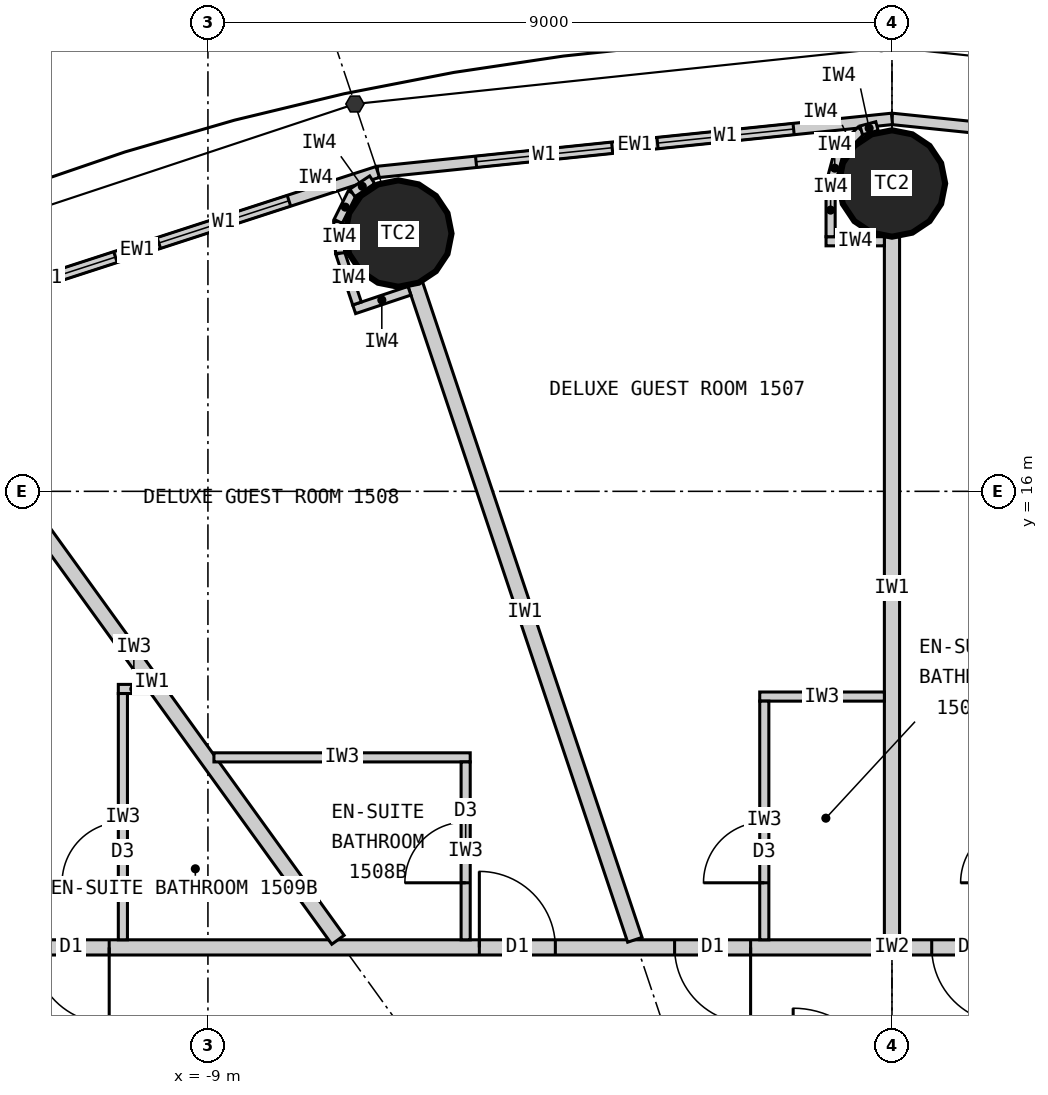
"""IFC4 building model, lengths in metres.
Left out: names, types, materials, properties, quantities, classifications, styles, units other than length and angle.
Written with IfcOpenShell. Run it as: python <this file> out.ifc"""

import sys

from ifc_helpers import new_model, si_unit, direction, frame, frame_2d, origin, origin_2d, place, context, subcontext, project, spatial, rectangle, circle, extrude, element, fill, save


model = new_model("IFC4")
c1 = context("Model", 3, precision=1e-05, world=origin(), true_north=direction((0.0, 1.0)))
c2 = subcontext(c1, "Body", "Model", "MODEL_VIEW")
j1 = project(units=[si_unit("LENGTHUNIT", "METRE"), si_unit("PLANEANGLEUNIT", "RADIAN")], contexts=[c1])
p1 = place(None, origin())
s1 = spatial("IfcSite", under=j1, at=p1, CompositionType="ELEMENT")
p2 = place(p1, origin())
s2 = spatial("IfcBuilding", under=s1, at=p2, CompositionType="ELEMENT")
p3 = place(p2, frame((0.0, 0.0, 63.9)))
s3 = spatial("IfcBuildingStorey", under=s2, at=p3, CompositionType="ELEMENT", Elevation=63.9)
for number, where, z_axis, x_axis in (
    (1, (0.0, 20.05, 0.0), (0.0, 0.0, 1.0), (1.0, 0.0, 0.0)),
    (2, (-6.495, 19.391, 0.0), (0.0, 0.0, 1.0), (1.0, 0.0, 0.0)),
):
    element("IfcColumn", number, at=place(p3, frame(where, z_axis=z_axis, x_axis=x_axis)), inside=s3, PredefinedType="COLUMN", context=c2, shape_type="SweptSolid", body=[
        extrude(circle(Radius=0.7, at=origin_2d()), origin(), (0.0, 0.0, 1.0), 3.3),
    ])
p4 = place(p3, frame((6.766, 20.202, 0.0), z_axis=(0.0, 0.0, 1.0), x_axis=(-0.994721394369, 0.102612609291, 0.0)))
e3 = element("IfcWall", 3, at=p4, inside=s3, PredefinedType="ELEMENTEDWALL", context=c2, shape_type="SweptSolid", body=[
    extrude(rectangle(XDim=6.802, YDim=0.15, at=frame_2d((3.401, 0.0))), origin(), (0.0, 0.0, 1.0), 3.12),
])
p5 = place(p4, frame((1.301, 0.0, 0.9)))
e4 = element("IfcOpeningElement", 4, at=p5, cuts=e3, PredefinedType="OPENING", context=c2, shape_type="SweptSolid", body=[
    extrude(rectangle(XDim=1.8, YDim=1.9, at=frame_2d((0.9, 0.95))), frame((0.0, 0.085, 0.0), z_axis=(0.0, -1.0, 0.0), x_axis=(1.0, 0.0, 0.0)), (0.0, 0.0, 1.0), 0.17),
])
p6 = place(p4, frame((3.701, 0.0, 0.9)))
e5 = element("IfcOpeningElement", 5, at=p6, cuts=e3, PredefinedType="OPENING", context=c2, shape_type="SweptSolid", body=[
    extrude(rectangle(XDim=1.8, YDim=1.9, at=frame_2d((0.9, 0.95))), frame((0.0, 0.085, 0.0), z_axis=(0.0, -1.0, 0.0), x_axis=(1.0, 0.0, 0.0)), (0.0, 0.0, 1.0), 0.17),
])
p7 = place(p3, frame((0.0, 20.9, 0.0), z_axis=(0.0, 0.0, 1.0), x_axis=(-0.994721394369, -0.102612609291, 0.0)))
e6 = element("IfcWall", 6, at=p7, inside=s3, PredefinedType="ELEMENTEDWALL", context=c2, shape_type="SweptSolid", body=[
    extrude(rectangle(XDim=6.802, YDim=0.15, at=frame_2d((3.401, 0.0))), origin(), (0.0, 0.0, 1.0), 3.12),
])
p8 = place(p7, frame((1.301, 0.0, 0.9)))
e7 = element("IfcOpeningElement", 7, at=p8, cuts=e6, PredefinedType="OPENING", context=c2, shape_type="SweptSolid", body=[
    extrude(rectangle(XDim=1.8, YDim=1.9, at=frame_2d((0.9, 0.95))), frame((0.0, 0.085, 0.0), z_axis=(0.0, -1.0, 0.0), x_axis=(1.0, 0.0, 0.0)), (0.0, 0.0, 1.0), 0.17),
])
p9 = place(p7, frame((3.701, 0.0, 0.9)))
e8 = element("IfcOpeningElement", 8, at=p9, cuts=e6, PredefinedType="OPENING", context=c2, shape_type="SweptSolid", body=[
    extrude(rectangle(XDim=1.8, YDim=1.9, at=frame_2d((0.9, 0.95))), frame((0.0, 0.085, 0.0), z_axis=(0.0, -1.0, 0.0), x_axis=(1.0, 0.0, 0.0)), (0.0, 0.0, 1.0), 0.17),
])
p10 = place(p3, frame((-6.766, 20.202, 0.0), z_axis=(0.0, 0.0, 1.0), x_axis=(-0.951137534625, -0.308767534285, 0.0)))
e9 = element("IfcWall", 9, at=p10, inside=s3, PredefinedType="ELEMENTEDWALL", context=c2, shape_type="SweptSolid", body=[
    extrude(rectangle(XDim=6.655, YDim=0.15, at=frame_2d((3.328, 0.0))), origin(), (0.0, 0.0, 1.0), 3.12),
])
p11 = place(p10, frame((1.228, 0.0, 0.9)))
e10 = element("IfcOpeningElement", 10, at=p11, cuts=e9, PredefinedType="OPENING", context=c2, shape_type="SweptSolid", body=[
    extrude(rectangle(XDim=1.8, YDim=1.9, at=frame_2d((0.9, 0.95))), frame((0.0, 0.085, 0.0), z_axis=(0.0, -1.0, 0.0), x_axis=(1.0, 0.0, 0.0)), (0.0, 0.0, 1.0), 0.17),
])
p12 = place(p10, frame((3.628, 0.0, 0.9)))
e11 = element("IfcOpeningElement", 11, at=p12, cuts=e9, PredefinedType="OPENING", context=c2, shape_type="SweptSolid", body=[
    extrude(rectangle(XDim=1.8, YDim=1.9, at=frame_2d((0.9, 0.95))), frame((0.0, 0.085, 0.0), z_axis=(0.0, -1.0, 0.0), x_axis=(1.0, 0.0, 0.0)), (0.0, 0.0, 1.0), 0.17),
])
p13 = place(p3, frame((-14.1, 10.0, 0.0), z_axis=(0.0, 0.0, 1.0), x_axis=(1.0, 0.0, 0.0)))
e12 = element("IfcWall", 12, at=p13, inside=s3, PredefinedType="PARTITIONING", context=c2, shape_type="SweptSolid", body=[
    extrude(rectangle(XDim=28.2, YDim=0.2, at=frame_2d((14.1, 0.0))), origin(), (0.0, 0.0, 1.0), 3.12),
])
p14 = place(p13, frame((18.529, 0.0, 0.0)))
e13 = element("IfcOpeningElement", 13, at=p14, cuts=e12, PredefinedType="OPENING", context=c2, shape_type="SweptSolid", body=[
    extrude(rectangle(XDim=1.0, YDim=2.2, at=frame_2d((0.5, 1.1))), frame((0.0, 0.11, 0.0), z_axis=(0.0, -1.0, 0.0), x_axis=(1.0, 0.0, 0.0)), (0.0, 0.0, 1.0), 0.22),
])
p15 = place(p13, frame((14.623, 0.0, 0.0)))
e14 = element("IfcOpeningElement", 14, at=p15, cuts=e12, PredefinedType="OPENING", context=c2, shape_type="SweptSolid", body=[
    extrude(rectangle(XDim=1.0, YDim=2.2, at=frame_2d((0.5, 1.1))), frame((0.0, 0.11, 0.0), z_axis=(0.0, -1.0, 0.0), x_axis=(1.0, 0.0, 0.0)), (0.0, 0.0, 1.0), 0.22),
])
p16 = place(p13, frame((11.24, 0.0, 0.0)))
e15 = element("IfcOpeningElement", 15, at=p16, cuts=e12, PredefinedType="OPENING", context=c2, shape_type="SweptSolid", body=[
    extrude(rectangle(XDim=1.0, YDim=2.2, at=frame_2d((0.5, 1.1))), frame((0.0, 0.11, 0.0), z_axis=(0.0, -1.0, 0.0), x_axis=(1.0, 0.0, 0.0)), (0.0, 0.0, 1.0), 0.22),
])
p17 = place(p13, frame((8.671, 0.0, 0.0)))
e16 = element("IfcOpeningElement", 16, at=p17, cuts=e12, PredefinedType="OPENING", context=c2, shape_type="SweptSolid", body=[
    extrude(rectangle(XDim=1.0, YDim=2.2, at=frame_2d((0.5, 1.1))), frame((0.0, 0.11, 0.0), z_axis=(0.0, -1.0, 0.0), x_axis=(1.0, 0.0, 0.0)), (0.0, 0.0, 1.0), 0.22),
])
p18 = place(p13, frame((2.801, 0.0, 0.0)))
e17 = element("IfcOpeningElement", 17, at=p18, cuts=e12, PredefinedType="OPENING", context=c2, shape_type="SweptSolid", body=[
    extrude(rectangle(XDim=1.0, YDim=2.2, at=frame_2d((0.5, 1.1))), frame((0.0, 0.11, 0.0), z_axis=(0.0, -1.0, 0.0), x_axis=(1.0, 0.0, 0.0)), (0.0, 0.0, 1.0), 0.22),
])
p19 = place(p3, frame((0.0, 10.1, 0.0), z_axis=(0.0, 0.0, 1.0), x_axis=(0.0, 1.0, 0.0)))
e18 = element("IfcWall", 18, at=p19, inside=s3, PredefinedType="PARTITIONING", context=c2, shape_type="SweptSolid", body=[
    extrude(rectangle(XDim=9.25, YDim=0.2, at=frame_2d((4.625, 0.0))), origin(), (0.0, 0.0, 1.0), 2.32),
])
p20 = place(p3, frame((-3.383, 10.1, 0.0), z_axis=(0.0, 0.0, 1.0), x_axis=(-0.31759592231, 0.948226149256, 0.0)))
e19 = element("IfcWall", 19, at=p20, inside=s3, PredefinedType="PARTITIONING", context=c2, shape_type="SweptSolid", body=[
    extrude(rectangle(XDim=9.098, YDim=0.2, at=frame_2d((4.549, 0.0))), origin(), (0.0, 0.0, 1.0), 2.32),
])
p21 = place(p3, frame((-7.289, 10.1, 0.0), z_axis=(0.0, 0.0, 1.0), x_axis=(-0.585198353053, 0.810890182197, 0.0)))
e20 = element("IfcWall", 20, at=p21, inside=s3, PredefinedType="PARTITIONING", context=c2, shape_type="SweptSolid", body=[
    extrude(rectangle(XDim=8.36, YDim=0.2, at=frame_2d((4.18, 0.0))), origin(), (0.0, 0.0, 1.0), 2.32),
])
p22 = place(p3, frame((-0.1, 13.3, 0.0), z_axis=(0.0, 0.0, 1.0), x_axis=(-1.0, 0.0, 0.0)))
e21 = element("IfcWall", 21, at=p22, inside=s3, PredefinedType="PARTITIONING", context=c2, shape_type="SweptSolid", body=[
    extrude(rectangle(XDim=1.64, YDim=0.12, at=frame_2d((0.82, 0.0))), origin(), (0.0, 0.0, 1.0), 3.12),
])
p23 = place(p3, frame((-1.68, 10.1, 0.0), z_axis=(0.0, 0.0, 1.0), x_axis=(0.0, 1.0, 0.0)))
e22 = element("IfcWall", 22, at=p23, inside=s3, PredefinedType="PARTITIONING", context=c2, shape_type="SweptSolid", body=[
    extrude(rectangle(XDim=3.14, YDim=0.12, at=frame_2d((1.57, 0.0))), origin(), (0.0, 0.0, 1.0), 3.12),
])
p24 = place(p23, frame((0.75, 0.0, 0.0)))
e23 = element("IfcOpeningElement", 23, at=p24, cuts=e22, PredefinedType="OPENING", context=c2, shape_type="SweptSolid", body=[
    extrude(rectangle(XDim=0.8, YDim=2.1, at=frame_2d((0.4, 1.05))), frame((0.0, 0.07, 0.0), z_axis=(0.0, -1.0, 0.0), x_axis=(1.0, 0.0, 0.0)), (0.0, 0.0, 1.0), 0.14),
])
p25 = place(p3, frame((-8.921, 12.5, 0.0), z_axis=(0.0, 0.0, 1.0), x_axis=(1.0, 0.0, 0.0)))
e24 = element("IfcWall", 24, at=p25, inside=s3, PredefinedType="PARTITIONING", context=c2, shape_type="SweptSolid", body=[
    extrude(rectangle(XDim=3.372, YDim=0.12, at=frame_2d((1.686, 0.0))), origin(), (0.0, 0.0, 1.0), 3.12),
])
p26 = place(p3, frame((-5.609, 10.1, 0.0), z_axis=(0.0, 0.0, 1.0), x_axis=(0.0, 1.0, 0.0)))
e25 = element("IfcWall", 25, at=p26, inside=s3, PredefinedType="PARTITIONING", context=c2, shape_type="SweptSolid", body=[
    extrude(rectangle(XDim=2.34, YDim=0.12, at=frame_2d((1.17, 0.0))), origin(), (0.0, 0.0, 1.0), 3.12),
])
p27 = place(p26, frame((0.75, 0.0, 0.0)))
e26 = element("IfcOpeningElement", 26, at=p27, cuts=e25, PredefinedType="OPENING", context=c2, shape_type="SweptSolid", body=[
    extrude(rectangle(XDim=0.8, YDim=2.1, at=frame_2d((0.4, 1.05))), frame((0.0, 0.07, 0.0), z_axis=(0.0, -1.0, 0.0), x_axis=(1.0, 0.0, 0.0)), (0.0, 0.0, 1.0), 0.14),
])
p28 = place(p3, frame((-9.771, 13.4, 0.0), z_axis=(0.0, 0.0, 1.0), x_axis=(-1.0, 0.0, 0.0)))
e27 = element("IfcWall", 27, at=p28, inside=s3, PredefinedType="PARTITIONING", context=c2, shape_type="SweptSolid", body=[
    extrude(rectangle(XDim=0.408, YDim=0.12, at=frame_2d((0.204, 0.0))), origin(), (0.0, 0.0, 1.0), 3.12),
])
p29 = place(p3, frame((-10.119, 10.1, 0.0), z_axis=(0.0, 0.0, 1.0), x_axis=(0.0, 1.0, 0.0)))
e28 = element("IfcWall", 28, at=p29, inside=s3, PredefinedType="PARTITIONING", context=c2, shape_type="SweptSolid", body=[
    extrude(rectangle(XDim=3.24, YDim=0.12, at=frame_2d((1.62, 0.0))), origin(), (0.0, 0.0, 1.0), 3.12),
])
p30 = place(p29, frame((0.75, 0.0, 0.0)))
e29 = element("IfcOpeningElement", 29, at=p30, cuts=e28, PredefinedType="OPENING", context=c2, shape_type="SweptSolid", body=[
    extrude(rectangle(XDim=0.8, YDim=2.1, at=frame_2d((0.4, 1.05))), frame((0.0, 0.07, 0.0), z_axis=(0.0, -1.0, 0.0), x_axis=(1.0, 0.0, 0.0)), (0.0, 0.0, 1.0), 0.14),
])
p31 = place(p3, frame((-0.1, 19.29, 0.0), z_axis=(0.0, 0.0, 1.0), x_axis=(-1.0, 0.0, 0.0)))
e30 = element("IfcWall", 30, at=p31, inside=s3, PredefinedType="PARTITIONING", context=c2, shape_type="SweptSolid", body=[
    extrude(rectangle(XDim=0.767, YDim=0.12, at=frame_2d((0.384, 0.0))), origin(), (0.0, 0.0, 1.0), 3.12),
])
p32 = place(p3, frame((-0.808, 19.35, 0.0), z_axis=(0.0, 0.0, 1.0), x_axis=(0.0, 1.0, 0.0)))
e31 = element("IfcWall", 31, at=p32, inside=s3, PredefinedType="PARTITIONING", context=c2, shape_type="SweptSolid", body=[
    extrude(rectangle(XDim=0.7, YDim=0.12, at=frame_2d((0.35, 0.0))), origin(), (0.0, 0.0, 1.0), 3.12),
])
p33 = place(p3, frame((-0.808, 20.05, 0.0), z_axis=(0.0, 0.0, 1.0), x_axis=(0.2592614205, 0.965807183573, 0.0)))
e32 = element("IfcWall", 32, at=p33, inside=s3, PredefinedType="PARTITIONING", context=c2, shape_type="SweptSolid", body=[
    extrude(rectangle(XDim=0.418, YDim=0.12, at=frame_2d((0.209, 0.0))), origin(), (0.0, 0.0, 1.0), 3.12),
])
p34 = place(p3, frame((-0.699, 20.454, 0.0), z_axis=(0.0, 0.0, 1.0), x_axis=(0.707106781187, 0.707106781187, 0.0)))
e33 = element("IfcWall", 33, at=p34, inside=s3, PredefinedType="PARTITIONING", context=c2, shape_type="SweptSolid", body=[
    extrude(rectangle(XDim=0.418, YDim=0.12, at=frame_2d((0.209, 0.0))), origin(), (0.0, 0.0, 1.0), 3.12),
])
p35 = place(p3, frame((-0.404, 20.749, 0.0), z_axis=(0.0, 0.0, 1.0), x_axis=(0.965759066438, 0.25944060128, 0.0)))
e34 = element("IfcWall", 34, at=p35, inside=s3, PredefinedType="PARTITIONING", context=c2, shape_type="SweptSolid", body=[
    extrude(rectangle(XDim=0.214, YDim=0.12, at=frame_2d((0.107, 0.0))), origin(), (0.0, 0.0, 1.0), 3.12),
])
p36 = place(p3, frame((-6.348, 18.639, 0.0), z_axis=(0.0, 0.0, 1.0), x_axis=(-0.948268951266, -0.317468102437, 0.0)))
e35 = element("IfcWall", 35, at=p36, inside=s3, PredefinedType="PARTITIONING", context=c2, shape_type="SweptSolid", body=[
    extrude(rectangle(XDim=0.768, YDim=0.12, at=frame_2d((0.384, 0.0))), origin(), (0.0, 0.0, 1.0), 3.12),
])
p37 = place(p3, frame((-7.038, 18.471, 0.0), z_axis=(0.0, 0.0, 1.0), x_axis=(-0.317378466199, 0.9482989556, 0.0)))
e36 = element("IfcWall", 36, at=p37, inside=s3, PredefinedType="PARTITIONING", context=c2, shape_type="SweptSolid", body=[
    extrude(rectangle(XDim=0.7, YDim=0.12, at=frame_2d((0.35, 0.0))), origin(), (0.0, 0.0, 1.0), 3.12),
])
p38 = place(p3, frame((-7.26, 19.135, 0.0), z_axis=(0.0, 0.0, 1.0), x_axis=(-0.0613238046, 0.99811792439, 0.0)))
e37 = element("IfcWall", 37, at=p38, inside=s3, PredefinedType="PARTITIONING", context=c2, shape_type="SweptSolid", body=[
    extrude(rectangle(XDim=0.418, YDim=0.12, at=frame_2d((0.209, 0.0))), origin(), (0.0, 0.0, 1.0), 3.12),
])
p39 = place(p3, frame((-7.286, 19.552, 0.0), z_axis=(0.0, 0.0, 1.0), x_axis=(0.445810757773, 0.89512723579, 0.0)))
e38 = element("IfcWall", 38, at=p39, inside=s3, PredefinedType="PARTITIONING", context=c2, shape_type="SweptSolid", body=[
    extrude(rectangle(XDim=0.418, YDim=0.12, at=frame_2d((0.209, 0.0))), origin(), (0.0, 0.0, 1.0), 3.12),
])
p40 = place(p3, frame((-7.1, 19.926, 0.0), z_axis=(0.0, 0.0, 1.0), x_axis=(0.833488262509, 0.552537162787, 0.0)))
e39 = element("IfcWall", 39, at=p40, inside=s3, PredefinedType="PARTITIONING", context=c2, shape_type="SweptSolid", body=[
    extrude(rectangle(XDim=0.313, YDim=0.12, at=frame_2d((0.156, 0.0))), origin(), (0.0, 0.0, 1.0), 3.12),
])
p41 = place(p8, origin())
e40 = element("IfcWindow", 40, at=p41, inside=s3, PartitioningType="SINGLE_PANEL", PredefinedType="WINDOW", context=c2, shape_type="SweptSolid", body=[
    extrude(rectangle(XDim=1.8, YDim=1.9, at=frame_2d((0.9, 0.95))), frame((0.0, 0.03, 0.0), z_axis=(0.0, -1.0, 0.0), x_axis=(1.0, 0.0, 0.0)), (0.0, 0.0, 1.0), 0.06),
])
fill(e7, e40)
p42 = place(p9, origin())
e41 = element("IfcWindow", 41, at=p42, inside=s3, PartitioningType="SINGLE_PANEL", PredefinedType="WINDOW", context=c2, shape_type="SweptSolid", body=[
    extrude(rectangle(XDim=1.8, YDim=1.9, at=frame_2d((0.9, 0.95))), frame((0.0, 0.03, 0.0), z_axis=(0.0, -1.0, 0.0), x_axis=(1.0, 0.0, 0.0)), (0.0, 0.0, 1.0), 0.06),
])
fill(e8, e41)
p43 = place(p11, origin())
e42 = element("IfcWindow", 42, at=p43, inside=s3, PartitioningType="SINGLE_PANEL", PredefinedType="WINDOW", context=c2, shape_type="SweptSolid", body=[
    extrude(rectangle(XDim=1.8, YDim=1.9, at=frame_2d((0.9, 0.95))), frame((0.0, 0.03, 0.0), z_axis=(0.0, -1.0, 0.0), x_axis=(1.0, 0.0, 0.0)), (0.0, 0.0, 1.0), 0.06),
])
fill(e10, e42)
p44 = place(p12, origin())
e43 = element("IfcWindow", 43, at=p44, inside=s3, PartitioningType="SINGLE_PANEL", PredefinedType="WINDOW", context=c2, shape_type="SweptSolid", body=[
    extrude(rectangle(XDim=1.8, YDim=1.9, at=frame_2d((0.9, 0.95))), frame((0.0, 0.03, 0.0), z_axis=(0.0, -1.0, 0.0), x_axis=(1.0, 0.0, 0.0)), (0.0, 0.0, 1.0), 0.06),
])
fill(e11, e43)
p45 = place(p15, origin())
e44 = element("IfcDoor", 44, at=p45, inside=s3, OperationType="SINGLE_SWING_RIGHT", PredefinedType="DOOR", context=c2, shape_type="SweptSolid", body=[
    extrude(rectangle(XDim=1.0, YDim=2.2, at=frame_2d((0.5, 1.1))), frame((0.0, 0.025, 0.0), z_axis=(0.0, -1.0, 0.0), x_axis=(1.0, 0.0, 0.0)), (0.0, 0.0, 1.0), 0.05),
])
fill(e14, e44)
p46 = place(p24, origin())
e45 = element("IfcDoor", 45, at=p46, inside=s3, OperationType="SINGLE_SWING_LEFT", PredefinedType="DOOR", context=c2, shape_type="SweptSolid", body=[
    extrude(rectangle(XDim=0.8, YDim=2.1, at=frame_2d((0.4, 1.05))), frame((0.0, 0.025, 0.0), z_axis=(0.0, -1.0, 0.0), x_axis=(1.0, 0.0, 0.0)), (0.0, 0.0, 1.0), 0.05),
])
fill(e23, e45)
p47 = place(p16, origin())
e46 = element("IfcDoor", 46, at=p47, inside=s3, OperationType="SINGLE_SWING_RIGHT", PredefinedType="DOOR", context=c2, shape_type="SweptSolid", body=[
    extrude(rectangle(XDim=1.0, YDim=2.2, at=frame_2d((0.5, 1.1))), frame((0.0, 0.025, 0.0), z_axis=(0.0, -1.0, 0.0), x_axis=(1.0, 0.0, 0.0)), (0.0, 0.0, 1.0), 0.05),
])
fill(e15, e46)
p48 = place(p27, origin())
e47 = element("IfcDoor", 47, at=p48, inside=s3, OperationType="SINGLE_SWING_LEFT", PredefinedType="DOOR", context=c2, shape_type="SweptSolid", body=[
    extrude(rectangle(XDim=0.8, YDim=2.1, at=frame_2d((0.4, 1.05))), frame((0.0, 0.025, 0.0), z_axis=(0.0, -1.0, 0.0), x_axis=(1.0, 0.0, 0.0)), (0.0, 0.0, 1.0), 0.05),
])
fill(e26, e47)
p49 = place(p17, origin())
e48 = element("IfcDoor", 48, at=p49, inside=s3, OperationType="SINGLE_SWING_LEFT", PredefinedType="DOOR", context=c2, shape_type="SweptSolid", body=[
    extrude(rectangle(XDim=1.0, YDim=2.2, at=frame_2d((0.5, 1.1))), frame((0.0, 0.025, 0.0), z_axis=(0.0, -1.0, 0.0), x_axis=(1.0, 0.0, 0.0)), (0.0, 0.0, 1.0), 0.05),
])
fill(e16, e48)
p50 = place(p30, origin())
e49 = element("IfcDoor", 49, at=p50, inside=s3, OperationType="SINGLE_SWING_LEFT", PredefinedType="DOOR", context=c2, shape_type="SweptSolid", body=[
    extrude(rectangle(XDim=0.8, YDim=2.1, at=frame_2d((0.4, 1.05))), frame((0.0, 0.025, 0.0), z_axis=(0.0, -1.0, 0.0), x_axis=(1.0, 0.0, 0.0)), (0.0, 0.0, 1.0), 0.05),
])
fill(e29, e49)
p51 = place(p18, origin())
e50 = element("IfcDoor", 50, at=p51, inside=s3, OperationType="SINGLE_SWING_RIGHT", PredefinedType="DOOR", context=c2, shape_type="SweptSolid", body=[
    extrude(rectangle(XDim=1.0, YDim=2.2, at=frame_2d((0.5, 1.1))), frame((0.0, 0.025, 0.0), z_axis=(0.0, -1.0, 0.0), x_axis=(1.0, 0.0, 0.0)), (0.0, 0.0, 1.0), 0.05),
])
fill(e17, e50)
save(model, sys.argv[1])
